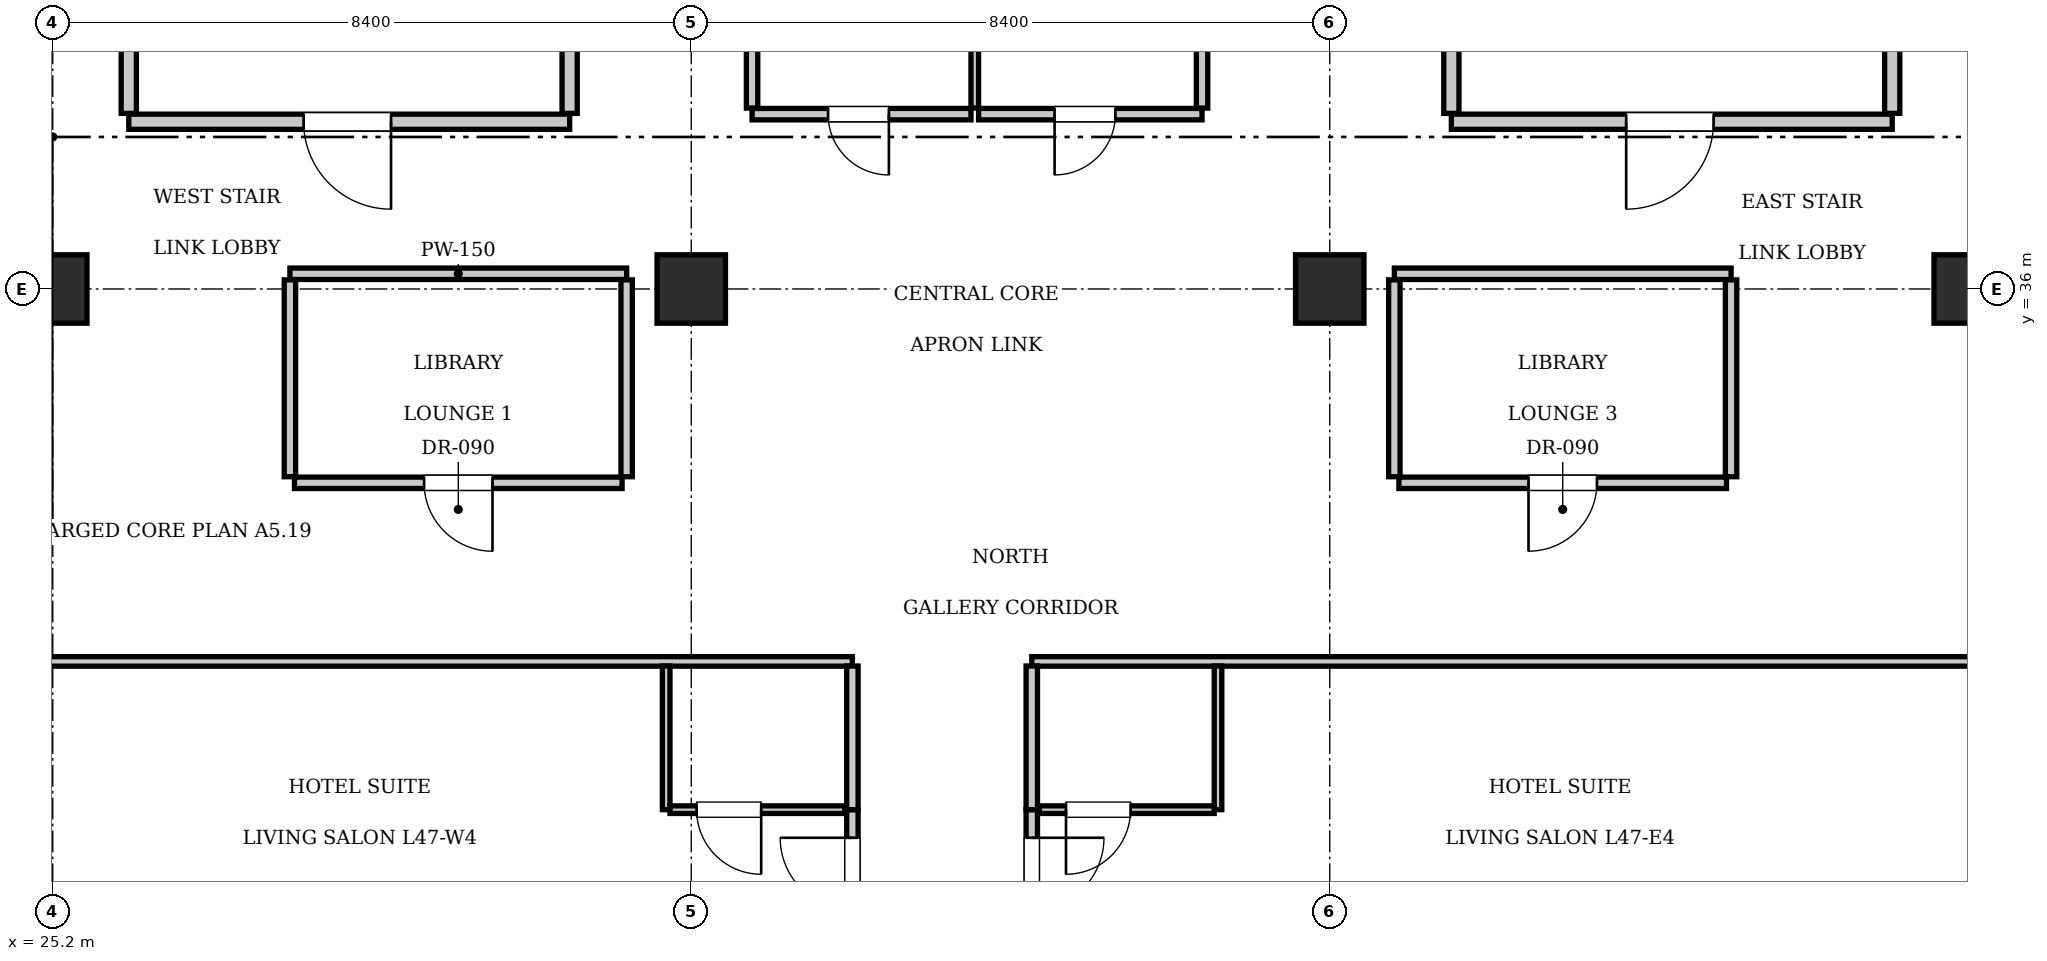
"""IFC4 building model, lengths in metres.
Left out: names, types, materials, properties, quantities, classifications, styles, units other than length and angle.
Written with IfcOpenShell. Run it as: python <this file> out.ifc"""

import sys

from ifc_helpers import new_model, si_unit, direction, frame, frame_2d, origin, origin_2d, place, context, subcontext, project, spatial, rectangle, extrude, element, fill, save


model = new_model("IFC4")
c1 = context("Model", 3, precision=1e-05, world=origin(), true_north=direction((0.0, 1.0)))
c2 = subcontext(c1, "Body", "Model", "MODEL_VIEW")
j1 = project(units=[si_unit("LENGTHUNIT", "METRE"), si_unit("PLANEANGLEUNIT", "RADIAN")], contexts=[c1])
p1 = place(None, origin())
s1 = spatial("IfcSite", under=j1, at=p1, CompositionType="ELEMENT")
p2 = place(p1, origin())
s2 = spatial("IfcBuilding", under=s1, at=p2, CompositionType="ELEMENT")
p3 = place(p2, frame((0.0, 0.0, 192.85)))
s3 = spatial("IfcBuildingStorey", under=s2, at=p3, CompositionType="ELEMENT", Elevation=192.85)
for number, where, z_axis, x_axis in (
    (1, (25.2, 36.0, 0.0), (0.0, 0.0, 1.0), (1.0, 0.0, 0.0)),
    (2, (33.6, 36.0, 0.0), (0.0, 0.0, 1.0), (1.0, 0.0, 0.0)),
    (3, (42.0, 36.0, 0.0), (0.0, 0.0, 1.0), (1.0, 0.0, 0.0)),
    (4, (50.4, 36.0, 0.0), (0.0, 0.0, 1.0), (1.0, 0.0, 0.0)),
):
    element("IfcColumn", number, at=place(p3, frame(where, z_axis=z_axis, x_axis=x_axis)), inside=s3, PredefinedType="COLUMN", context=c2, shape_type="SweptSolid", body=[
        extrude(rectangle(XDim=0.9, YDim=0.9, at=origin_2d()), origin(), (0.0, 0.0, 1.0), 3.85),
    ])
p4 = place(p3, frame((26.2, 38.2, 0.0), z_axis=(0.0, 0.0, 1.0), x_axis=(1.0, 0.0, 0.0)))
e5 = element("IfcWall", 5, at=p4, inside=s3, PredefinedType="PARTITIONING", context=c2, shape_type="SweptSolid", body=[
    extrude(rectangle(XDim=5.8, YDim=0.2, at=frame_2d((2.9, 0.0))), origin(), (0.0, 0.0, 1.0), 3.61),
])
p5 = place(p4, frame((2.3, 0.0, 0.0)))
e6 = element("IfcOpeningElement", 6, at=p5, cuts=e5, PredefinedType="OPENING", context=c2, shape_type="SweptSolid", body=[
    extrude(rectangle(XDim=1.15, YDim=2.15, at=frame_2d((0.575, 1.075))), frame((0.0, 0.11, 0.0), z_axis=(0.0, -1.0, 0.0), x_axis=(1.0, 0.0, 0.0)), (0.0, 0.0, 1.0), 0.22),
])
for number, where, z_axis, x_axis in (
    (7, (26.2, 38.31, 0.0), (0.0, 0.0, 1.0), (0.0, 1.0, 0.0)),
    (8, (32.0, 38.31, 0.0), (0.0, 0.0, 1.0), (0.0, 1.0, 0.0)),
):
    element("IfcWall", number, at=place(p3, frame(where, z_axis=z_axis, x_axis=x_axis)), inside=s3, PredefinedType="PARTITIONING", context=c2, shape_type="SweptSolid", body=[
        extrude(rectangle(XDim=3.07, YDim=0.2, at=frame_2d((1.535, 0.0))), origin(), (0.0, 0.0, 1.0), 3.61),
    ])
p6 = place(p3, frame((43.6, 38.2, 0.0), z_axis=(0.0, 0.0, 1.0), x_axis=(1.0, 0.0, 0.0)))
e9 = element("IfcWall", 9, at=p6, inside=s3, PredefinedType="PARTITIONING", context=c2, shape_type="SweptSolid", body=[
    extrude(rectangle(XDim=5.8, YDim=0.2, at=frame_2d((2.9, 0.0))), origin(), (0.0, 0.0, 1.0), 3.61),
])
p7 = place(p6, frame((2.3, 0.0, 0.0)))
e10 = element("IfcOpeningElement", 10, at=p7, cuts=e9, PredefinedType="OPENING", context=c2, shape_type="SweptSolid", body=[
    extrude(rectangle(XDim=1.15, YDim=2.15, at=frame_2d((0.575, 1.075))), frame((0.0, 0.11, 0.0), z_axis=(0.0, -1.0, 0.0), x_axis=(1.0, 0.0, 0.0)), (0.0, 0.0, 1.0), 0.22),
])
for number, where, z_axis, x_axis in (
    (11, (43.6, 38.31, 0.0), (0.0, 0.0, 1.0), (0.0, 1.0, 0.0)),
    (12, (49.4, 38.31, 0.0), (0.0, 0.0, 1.0), (0.0, 1.0, 0.0)),
):
    element("IfcWall", number, at=place(p3, frame(where, z_axis=z_axis, x_axis=x_axis)), inside=s3, PredefinedType="PARTITIONING", context=c2, shape_type="SweptSolid", body=[
        extrude(rectangle(XDim=3.07, YDim=0.2, at=frame_2d((1.535, 0.0))), origin(), (0.0, 0.0, 1.0), 3.61),
    ])
p8 = place(p3, frame((34.4, 38.3, 0.0), z_axis=(0.0, 0.0, 1.0), x_axis=(1.0, 0.0, 0.0)))
e13 = element("IfcWall", 13, at=p8, inside=s3, PredefinedType="PARTITIONING", context=c2, shape_type="SweptSolid", body=[
    extrude(rectangle(XDim=2.88, YDim=0.15, at=frame_2d((1.44, 0.0))), origin(), (0.0, 0.0, 1.0), 3.61),
])
p9 = place(p8, frame((1.0, 0.0, 0.0)))
e14 = element("IfcOpeningElement", 14, at=p9, cuts=e13, PredefinedType="OPENING", context=c2, shape_type="SweptSolid", body=[
    extrude(rectangle(XDim=0.8, YDim=2.05, at=frame_2d((0.4, 1.025))), frame((0.0, 0.085, 0.0), z_axis=(0.0, -1.0, 0.0), x_axis=(1.0, 0.0, 0.0)), (0.0, 0.0, 1.0), 0.17),
])
p10 = place(p3, frame((37.38, 38.3, 0.0), z_axis=(0.0, 0.0, 1.0), x_axis=(1.0, 0.0, 0.0)))
e15 = element("IfcWall", 15, at=p10, inside=s3, PredefinedType="PARTITIONING", context=c2, shape_type="SweptSolid", body=[
    extrude(rectangle(XDim=2.94, YDim=0.15, at=frame_2d((1.47, 0.0))), origin(), (0.0, 0.0, 1.0), 3.61),
])
p11 = place(p10, frame((1.0, 0.0, 0.0)))
e16 = element("IfcOpeningElement", 16, at=p11, cuts=e15, PredefinedType="OPENING", context=c2, shape_type="SweptSolid", body=[
    extrude(rectangle(XDim=0.8, YDim=2.05, at=frame_2d((0.4, 1.025))), frame((0.0, 0.085, 0.0), z_axis=(0.0, -1.0, 0.0), x_axis=(1.0, 0.0, 0.0)), (0.0, 0.0, 1.0), 0.17),
])
p12 = place(p3, frame((34.4, 38.38, 0.0), z_axis=(0.0, 0.0, 1.0), x_axis=(0.0, 1.0, 0.0)))
e17 = element("IfcWall", 17, at=p12, inside=s3, PredefinedType="PARTITIONING", context=c2, shape_type="SweptSolid", body=[
    extrude(rectangle(XDim=2.84, YDim=0.15, at=frame_2d((1.42, 0.0))), origin(), (0.0, 0.0, 1.0), 3.61),
])
p13 = place(p3, frame((37.33, 38.38, 0.0), z_axis=(0.0, 0.0, 1.0), x_axis=(0.0, 1.0, 0.0)))
e18 = element("IfcWall", 18, at=p13, inside=s3, PredefinedType="PARTITIONING", context=c2, shape_type="SweptSolid", body=[
    extrude(rectangle(XDim=2.84, YDim=0.1, at=frame_2d((1.42, 0.0))), origin(), (0.0, 0.0, 1.0), 3.61),
])
p14 = place(p3, frame((40.32, 38.38, 0.0), z_axis=(0.0, 0.0, 1.0), x_axis=(0.0, 1.0, 0.0)))
e19 = element("IfcWall", 19, at=p14, inside=s3, PredefinedType="PARTITIONING", context=c2, shape_type="SweptSolid", body=[
    extrude(rectangle(XDim=2.84, YDim=0.15, at=frame_2d((1.42, 0.0))), origin(), (0.0, 0.0, 1.0), 3.61),
])
p15 = place(p3, frame((28.32, 36.2, 0.0), z_axis=(0.0, 0.0, 1.0), x_axis=(1.0, 0.0, 0.0)))
e20 = element("IfcWall", 20, at=p15, inside=s3, PredefinedType="PARTITIONING", context=c2, shape_type="SweptSolid", body=[
    extrude(rectangle(XDim=4.43, YDim=0.15, at=frame_2d((2.215, 0.0))), origin(), (0.0, 0.0, 1.0), 3.61),
])
for number, where, z_axis, x_axis in (
    (21, (28.32, 33.53, 0.0), (0.0, 0.0, 1.0), (0.0, 1.0, 0.0)),
    (22, (32.75, 33.53, 0.0), (0.0, 0.0, 1.0), (0.0, 1.0, 0.0)),
):
    element("IfcWall", number, at=place(p3, frame(where, z_axis=z_axis, x_axis=x_axis)), inside=s3, PredefinedType="PARTITIONING", context=c2, shape_type="SweptSolid", body=[
        extrude(rectangle(XDim=2.59, YDim=0.15, at=frame_2d((1.295, 0.0))), origin(), (0.0, 0.0, 1.0), 3.61),
    ])
p16 = place(p3, frame((28.38, 33.45, 0.0), z_axis=(0.0, 0.0, 1.0), x_axis=(1.0, 0.0, 0.0)))
e23 = element("IfcWall", 23, at=p16, inside=s3, PredefinedType="PARTITIONING", context=c2, shape_type="SweptSolid", body=[
    extrude(rectangle(XDim=4.31, YDim=0.15, at=frame_2d((2.155, 0.0))), origin(), (0.0, 0.0, 1.0), 3.61),
])
p17 = place(p16, frame((1.705, 0.0, 0.0)))
e24 = element("IfcOpeningElement", 24, at=p17, cuts=e23, PredefinedType="OPENING", context=c2, shape_type="SweptSolid", body=[
    extrude(rectangle(XDim=0.9, YDim=2.1, at=frame_2d((0.45, 1.05))), frame((0.0, 0.085, 0.0), z_axis=(0.0, -1.0, 0.0), x_axis=(1.0, 0.0, 0.0)), (0.0, 0.0, 1.0), 0.17),
])
p18 = place(p3, frame((42.85, 36.2, 0.0), z_axis=(0.0, 0.0, 1.0), x_axis=(1.0, 0.0, 0.0)))
e25 = element("IfcWall", 25, at=p18, inside=s3, PredefinedType="PARTITIONING", context=c2, shape_type="SweptSolid", body=[
    extrude(rectangle(XDim=4.43, YDim=0.15, at=frame_2d((2.215, 0.0))), origin(), (0.0, 0.0, 1.0), 3.61),
])
for number, where, z_axis, x_axis in (
    (26, (42.85, 33.53, 0.0), (0.0, 0.0, 1.0), (0.0, 1.0, 0.0)),
    (27, (47.28, 33.53, 0.0), (0.0, 0.0, 1.0), (0.0, 1.0, 0.0)),
):
    element("IfcWall", number, at=place(p3, frame(where, z_axis=z_axis, x_axis=x_axis)), inside=s3, PredefinedType="PARTITIONING", context=c2, shape_type="SweptSolid", body=[
        extrude(rectangle(XDim=2.59, YDim=0.15, at=frame_2d((1.295, 0.0))), origin(), (0.0, 0.0, 1.0), 3.61),
    ])
p19 = place(p3, frame((42.91, 33.45, 0.0), z_axis=(0.0, 0.0, 1.0), x_axis=(1.0, 0.0, 0.0)))
e28 = element("IfcWall", 28, at=p19, inside=s3, PredefinedType="PARTITIONING", context=c2, shape_type="SweptSolid", body=[
    extrude(rectangle(XDim=4.31, YDim=0.15, at=frame_2d((2.155, 0.0))), origin(), (0.0, 0.0, 1.0), 3.61),
])
p20 = place(p19, frame((1.705, 0.0, 0.0)))
e29 = element("IfcOpeningElement", 29, at=p20, cuts=e28, PredefinedType="OPENING", context=c2, shape_type="SweptSolid", body=[
    extrude(rectangle(XDim=0.9, YDim=2.1, at=frame_2d((0.45, 1.05))), frame((0.0, 0.085, 0.0), z_axis=(0.0, -1.0, 0.0), x_axis=(1.0, 0.0, 0.0)), (0.0, 0.0, 1.0), 0.17),
])
p21 = place(p3, frame((13.2, 31.1, 0.0), z_axis=(0.0, 0.0, 1.0), x_axis=(1.0, 0.0, 0.0)))
e30 = element("IfcWall", 30, at=p21, inside=s3, PredefinedType="PARTITIONING", context=c2, shape_type="SweptSolid", body=[
    extrude(rectangle(XDim=22.52, YDim=0.125, at=frame_2d((11.26, 0.0))), origin(), (0.0, 0.0, 1.0), 3.61),
])
p22 = place(p3, frame((38.08, 31.1, 0.0), z_axis=(0.0, 0.0, 1.0), x_axis=(1.0, 0.0, 0.0)))
e31 = element("IfcWall", 31, at=p22, inside=s3, PredefinedType="PARTITIONING", context=c2, shape_type="SweptSolid", body=[
    extrude(rectangle(XDim=24.32, YDim=0.125, at=frame_2d((12.16, 0.0))), origin(), (0.0, 0.0, 1.0), 3.61),
])
p23 = place(p3, frame((35.72, 27.46, 0.0), z_axis=(0.0, 0.0, 1.0), x_axis=(0.0, 1.0, 0.0)))
e32 = element("IfcWall", 32, at=p23, inside=s3, PredefinedType="PARTITIONING", context=c2, shape_type="SweptSolid", body=[
    extrude(rectangle(XDim=1.69, YDim=0.15, at=frame_2d((0.845, 0.0))), origin(), (0.0, 0.0, 1.0), 3.61),
])
p24 = place(p23, frame((0.37, 0.0, 0.0)))
e33 = element("IfcOpeningElement", 33, at=p24, cuts=e32, PredefinedType="OPENING", context=c2, shape_type="SweptSolid", body=[
    extrude(rectangle(XDim=0.95, YDim=2.15, at=frame_2d((0.475, 1.075))), frame((0.0, 0.085, 0.0), z_axis=(0.0, -1.0, 0.0), x_axis=(1.0, 0.0, 0.0)), (0.0, 0.0, 1.0), 0.17),
])
p25 = place(p3, frame((35.72, 29.15, 0.0), z_axis=(0.0, 0.0, 1.0), x_axis=(0.0, 1.0, 0.0)))
e34 = element("IfcWall", 34, at=p25, inside=s3, PredefinedType="PARTITIONING", context=c2, shape_type="SweptSolid", body=[
    extrude(rectangle(XDim=1.89, YDim=0.15, at=frame_2d((0.945, 0.0))), origin(), (0.0, 0.0, 1.0), 3.61),
])
p26 = place(p3, frame((33.27, 29.15, 0.0), z_axis=(0.0, 0.0, 1.0), x_axis=(0.0, 1.0, 0.0)))
e35 = element("IfcWall", 35, at=p26, inside=s3, PredefinedType="PARTITIONING", context=c2, shape_type="SweptSolid", body=[
    extrude(rectangle(XDim=1.89, YDim=0.1, at=frame_2d((0.945, 0.0))), origin(), (0.0, 0.0, 1.0), 3.61),
])
p27 = place(p3, frame((33.32, 29.15, 0.0), z_axis=(0.0, 0.0, 1.0), x_axis=(1.0, 0.0, 0.0)))
e36 = element("IfcWall", 36, at=p27, inside=s3, PredefinedType="PARTITIONING", context=c2, shape_type="SweptSolid", body=[
    extrude(rectangle(XDim=2.3, YDim=0.1, at=frame_2d((1.15, 0.0))), origin(), (0.0, 0.0, 1.0), 3.61),
])
p28 = place(p27, frame((0.35, 0.0, 0.0)))
e37 = element("IfcOpeningElement", 37, at=p28, cuts=e36, PredefinedType="OPENING", context=c2, shape_type="SweptSolid", body=[
    extrude(rectangle(XDim=0.85, YDim=2.1, at=frame_2d((0.425, 1.05))), frame((0.0, 0.06, 0.0), z_axis=(0.0, -1.0, 0.0), x_axis=(1.0, 0.0, 0.0)), (0.0, 0.0, 1.0), 0.12),
])
p29 = place(p3, frame((38.08, 27.46, 0.0), z_axis=(0.0, 0.0, 1.0), x_axis=(0.0, 1.0, 0.0)))
e38 = element("IfcWall", 38, at=p29, inside=s3, PredefinedType="PARTITIONING", context=c2, shape_type="SweptSolid", body=[
    extrude(rectangle(XDim=1.69, YDim=0.15, at=frame_2d((0.845, 0.0))), origin(), (0.0, 0.0, 1.0), 3.61),
])
p30 = place(p29, frame((0.37, 0.0, 0.0)))
e39 = element("IfcOpeningElement", 39, at=p30, cuts=e38, PredefinedType="OPENING", context=c2, shape_type="SweptSolid", body=[
    extrude(rectangle(XDim=0.95, YDim=2.15, at=frame_2d((0.475, 1.075))), frame((0.0, 0.085, 0.0), z_axis=(0.0, -1.0, 0.0), x_axis=(1.0, 0.0, 0.0)), (0.0, 0.0, 1.0), 0.17),
])
p31 = place(p3, frame((38.08, 29.15, 0.0), z_axis=(0.0, 0.0, 1.0), x_axis=(0.0, 1.0, 0.0)))
e40 = element("IfcWall", 40, at=p31, inside=s3, PredefinedType="PARTITIONING", context=c2, shape_type="SweptSolid", body=[
    extrude(rectangle(XDim=1.89, YDim=0.15, at=frame_2d((0.945, 0.0))), origin(), (0.0, 0.0, 1.0), 3.61),
])
p32 = place(p3, frame((40.53, 29.15, 0.0), z_axis=(0.0, 0.0, 1.0), x_axis=(0.0, 1.0, 0.0)))
e41 = element("IfcWall", 41, at=p32, inside=s3, PredefinedType="PARTITIONING", context=c2, shape_type="SweptSolid", body=[
    extrude(rectangle(XDim=1.89, YDim=0.1, at=frame_2d((0.945, 0.0))), origin(), (0.0, 0.0, 1.0), 3.61),
])
p33 = place(p3, frame((38.18, 29.15, 0.0), z_axis=(0.0, 0.0, 1.0), x_axis=(1.0, 0.0, 0.0)))
e42 = element("IfcWall", 42, at=p33, inside=s3, PredefinedType="PARTITIONING", context=c2, shape_type="SweptSolid", body=[
    extrude(rectangle(XDim=2.3, YDim=0.1, at=frame_2d((1.15, 0.0))), origin(), (0.0, 0.0, 1.0), 3.61),
])
p34 = place(p33, frame((0.35, 0.0, 0.0)))
e43 = element("IfcOpeningElement", 43, at=p34, cuts=e42, PredefinedType="OPENING", context=c2, shape_type="SweptSolid", body=[
    extrude(rectangle(XDim=0.85, YDim=2.1, at=frame_2d((0.425, 1.05))), frame((0.0, 0.06, 0.0), z_axis=(0.0, -1.0, 0.0), x_axis=(1.0, 0.0, 0.0)), (0.0, 0.0, 1.0), 0.12),
])
p35 = place(p5, frame((1.15, 0.0, 0.0), z_axis=(0.0, 0.0, 1.0), x_axis=(-1.0, 0.0, 0.0)))
e44 = element("IfcDoor", 44, at=p35, inside=s3, OperationType="SINGLE_SWING_LEFT", PredefinedType="DOOR", context=c2, shape_type="SweptSolid", body=[
    extrude(rectangle(XDim=1.15, YDim=2.15, at=frame_2d((0.575, 1.075))), frame((0.0, 0.025, 0.0), z_axis=(0.0, -1.0, 0.0), x_axis=(1.0, 0.0, 0.0)), (0.0, 0.0, 1.0), 0.05),
])
fill(e6, e44)
p36 = place(p7, frame((1.15, 0.0, 0.0), z_axis=(0.0, 0.0, 1.0), x_axis=(-1.0, 0.0, 0.0)))
e45 = element("IfcDoor", 45, at=p36, inside=s3, OperationType="SINGLE_SWING_RIGHT", PredefinedType="DOOR", context=c2, shape_type="SweptSolid", body=[
    extrude(rectangle(XDim=1.15, YDim=2.15, at=frame_2d((0.575, 1.075))), frame((0.0, 0.025, 0.0), z_axis=(0.0, -1.0, 0.0), x_axis=(1.0, 0.0, 0.0)), (0.0, 0.0, 1.0), 0.05),
])
fill(e10, e45)
p37 = place(p9, frame((0.8, 0.0, 0.0), z_axis=(0.0, 0.0, 1.0), x_axis=(-1.0, 0.0, 0.0)))
e46 = element("IfcDoor", 46, at=p37, inside=s3, OperationType="SINGLE_SWING_LEFT", PredefinedType="DOOR", context=c2, shape_type="SweptSolid", body=[
    extrude(rectangle(XDim=0.8, YDim=2.05, at=frame_2d((0.4, 1.025))), frame((0.0, 0.025, 0.0), z_axis=(0.0, -1.0, 0.0), x_axis=(1.0, 0.0, 0.0)), (0.0, 0.0, 1.0), 0.05),
])
fill(e14, e46)
p38 = place(p11, frame((0.8, 0.0, 0.0), z_axis=(0.0, 0.0, 1.0), x_axis=(-1.0, 0.0, 0.0)))
e47 = element("IfcDoor", 47, at=p38, inside=s3, OperationType="SINGLE_SWING_RIGHT", PredefinedType="DOOR", context=c2, shape_type="SweptSolid", body=[
    extrude(rectangle(XDim=0.8, YDim=2.05, at=frame_2d((0.4, 1.025))), frame((0.0, 0.025, 0.0), z_axis=(0.0, -1.0, 0.0), x_axis=(1.0, 0.0, 0.0)), (0.0, 0.0, 1.0), 0.05),
])
fill(e16, e47)
p39 = place(p17, frame((0.9, 0.0, 0.0), z_axis=(0.0, 0.0, 1.0), x_axis=(-1.0, 0.0, 0.0)))
e48 = element("IfcDoor", 48, at=p39, inside=s3, OperationType="SINGLE_SWING_LEFT", PredefinedType="DOOR", context=c2, shape_type="SweptSolid", body=[
    extrude(rectangle(XDim=0.9, YDim=2.1, at=frame_2d((0.45, 1.05))), frame((0.0, 0.025, 0.0), z_axis=(0.0, -1.0, 0.0), x_axis=(1.0, 0.0, 0.0)), (0.0, 0.0, 1.0), 0.05),
])
fill(e24, e48)
p40 = place(p20, frame((0.9, 0.0, 0.0), z_axis=(0.0, 0.0, 1.0), x_axis=(-1.0, 0.0, 0.0)))
e49 = element("IfcDoor", 49, at=p40, inside=s3, OperationType="SINGLE_SWING_RIGHT", PredefinedType="DOOR", context=c2, shape_type="SweptSolid", body=[
    extrude(rectangle(XDim=0.9, YDim=2.1, at=frame_2d((0.45, 1.05))), frame((0.0, 0.025, 0.0), z_axis=(0.0, -1.0, 0.0), x_axis=(1.0, 0.0, 0.0)), (0.0, 0.0, 1.0), 0.05),
])
fill(e29, e49)
p41 = place(p28, frame((0.85, 0.0, 0.0), z_axis=(0.0, 0.0, 1.0), x_axis=(-1.0, 0.0, 0.0)))
e50 = element("IfcDoor", 50, at=p41, inside=s3, OperationType="SINGLE_SWING_LEFT", PredefinedType="DOOR", context=c2, shape_type="SweptSolid", body=[
    extrude(rectangle(XDim=0.85, YDim=2.1, at=frame_2d((0.425, 1.05))), frame((0.0, 0.025, 0.0), z_axis=(0.0, -1.0, 0.0), x_axis=(1.0, 0.0, 0.0)), (0.0, 0.0, 1.0), 0.05),
])
fill(e37, e50)
p42 = place(p24, origin())
e51 = element("IfcDoor", 51, at=p42, inside=s3, OperationType="SINGLE_SWING_RIGHT", PredefinedType="DOOR", context=c2, shape_type="SweptSolid", body=[
    extrude(rectangle(XDim=0.95, YDim=2.15, at=frame_2d((0.475, 1.075))), frame((0.0, 0.025, 0.0), z_axis=(0.0, -1.0, 0.0), x_axis=(1.0, 0.0, 0.0)), (0.0, 0.0, 1.0), 0.05),
])
fill(e33, e51)
p43 = place(p34, frame((0.85, 0.0, 0.0), z_axis=(0.0, 0.0, 1.0), x_axis=(-1.0, 0.0, 0.0)))
e52 = element("IfcDoor", 52, at=p43, inside=s3, OperationType="SINGLE_SWING_RIGHT", PredefinedType="DOOR", context=c2, shape_type="SweptSolid", body=[
    extrude(rectangle(XDim=0.85, YDim=2.1, at=frame_2d((0.425, 1.05))), frame((0.0, 0.025, 0.0), z_axis=(0.0, -1.0, 0.0), x_axis=(1.0, 0.0, 0.0)), (0.0, 0.0, 1.0), 0.05),
])
fill(e43, e52)
p44 = place(p30, frame((0.95, 0.0, 0.0), z_axis=(0.0, 0.0, 1.0), x_axis=(-1.0, 0.0, 0.0)))
e53 = element("IfcDoor", 53, at=p44, inside=s3, OperationType="SINGLE_SWING_LEFT", PredefinedType="DOOR", context=c2, shape_type="SweptSolid", body=[
    extrude(rectangle(XDim=0.95, YDim=2.15, at=frame_2d((0.475, 1.075))), frame((0.0, 0.025, 0.0), z_axis=(0.0, -1.0, 0.0), x_axis=(1.0, 0.0, 0.0)), (0.0, 0.0, 1.0), 0.05),
])
fill(e39, e53)
save(model, sys.argv[1])
